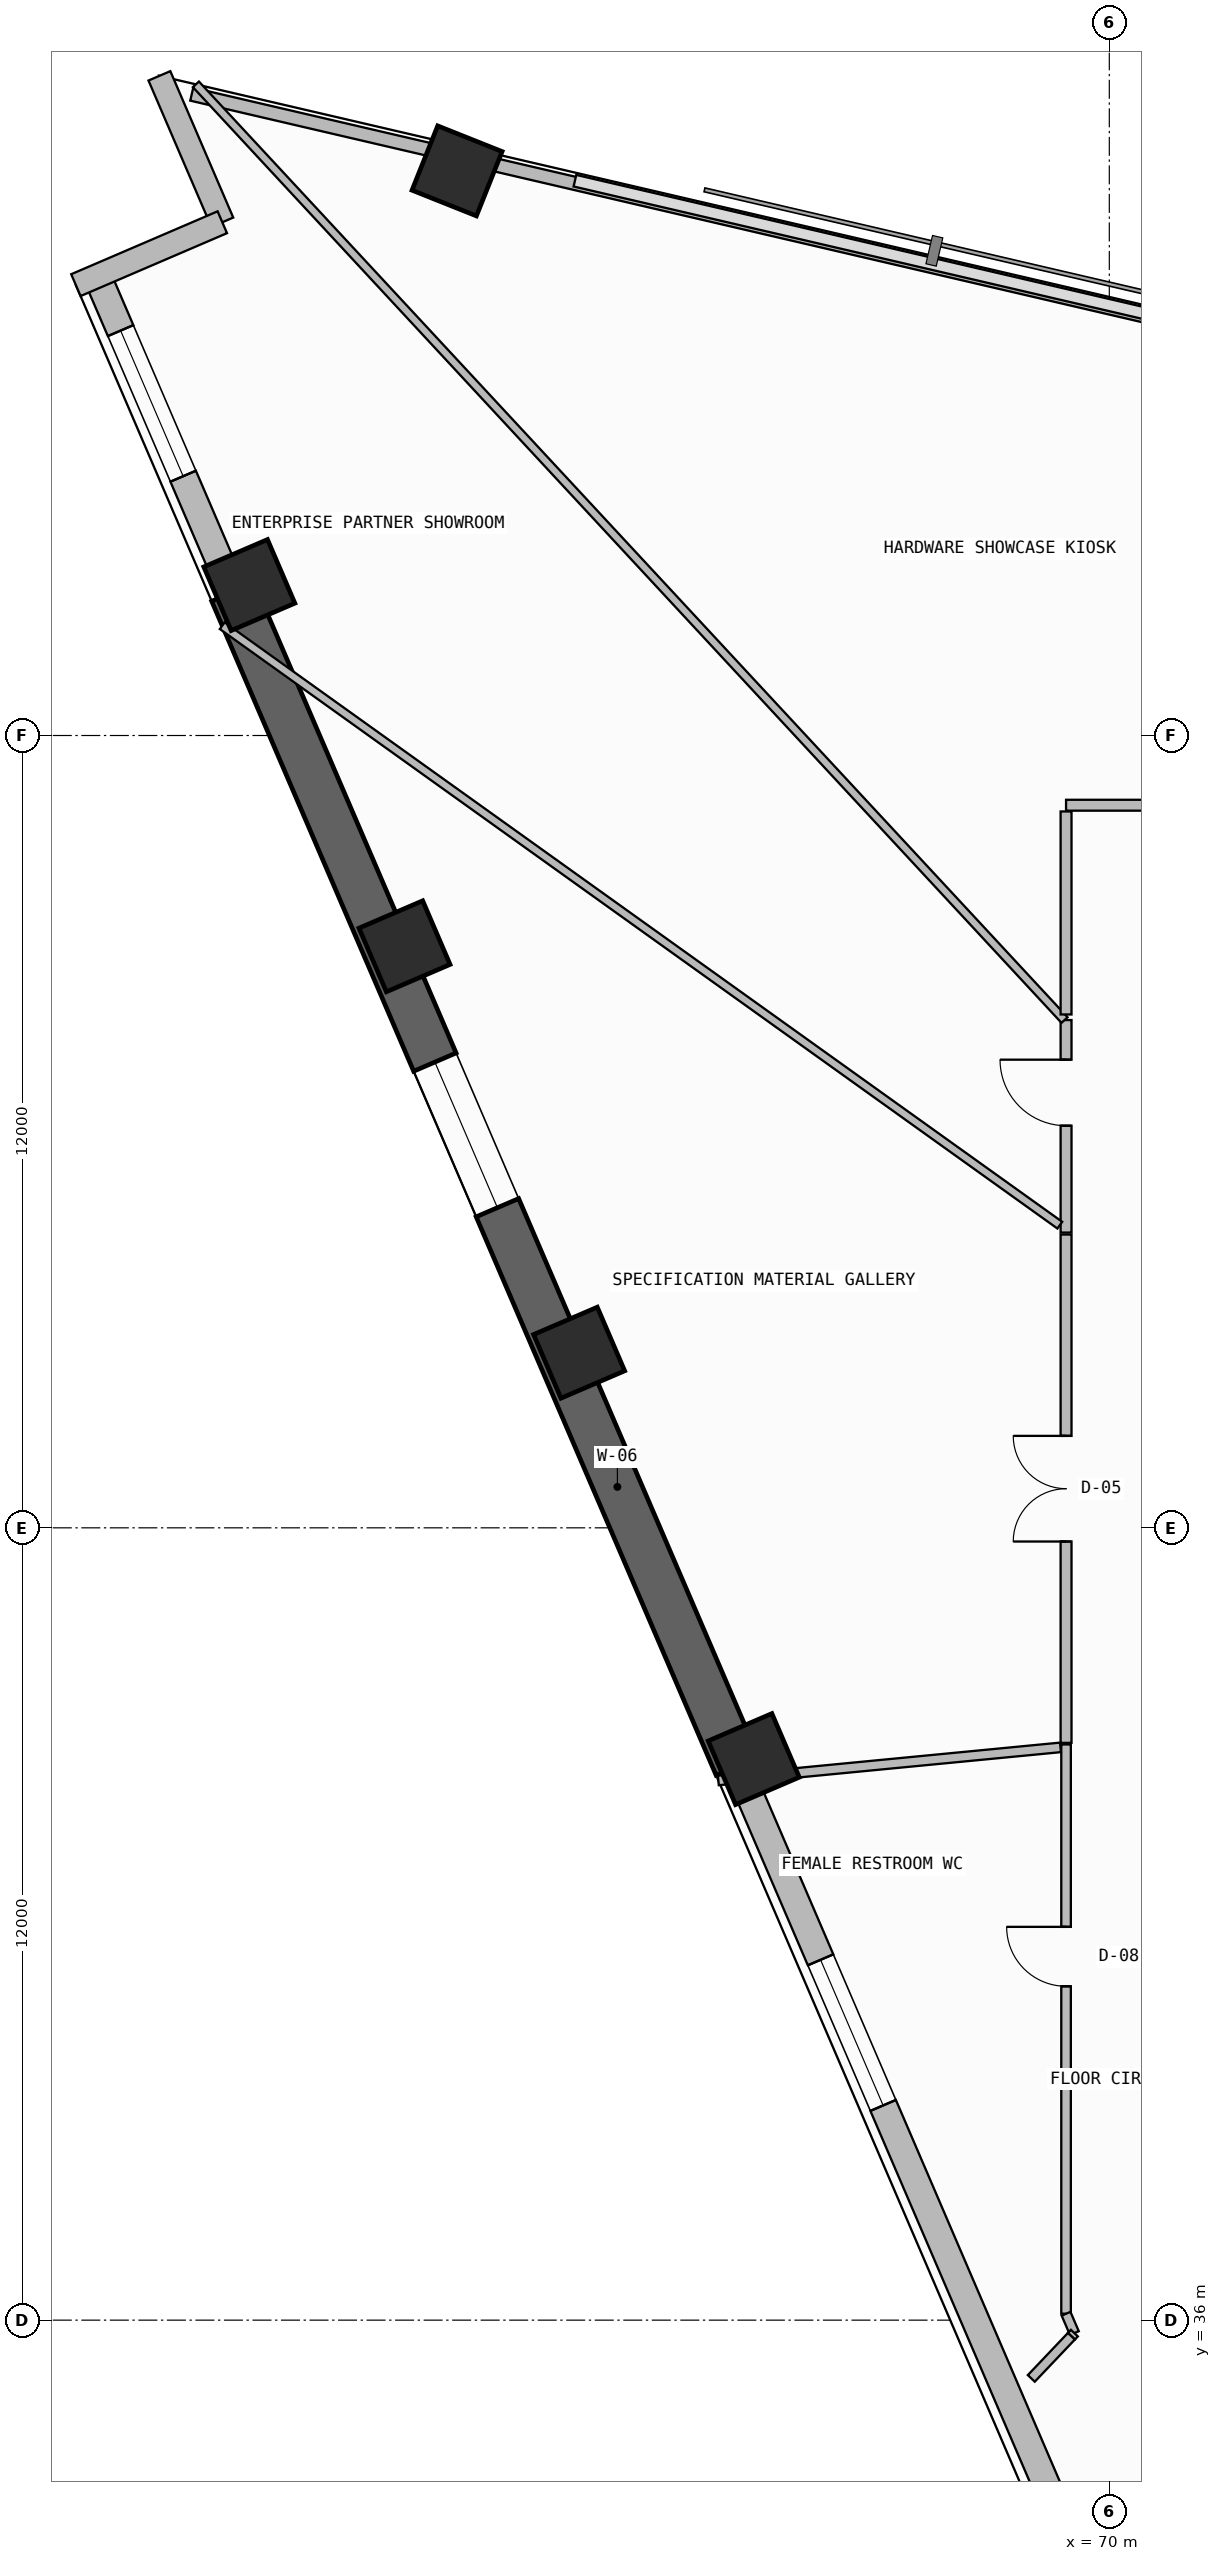
"""IFC4 building model, lengths in metres.
Left out: names, types, materials, properties, quantities, classifications, styles, units other than length and angle.
Written with IfcOpenShell. Run it as: python <this file> out.ifc"""

import sys

from ifc_helpers import new_model, si_unit, direction, frame, frame_2d, origin, origin_2d, place, context, subcontext, project, spatial, rectangle, extrude, element, fill, save


model = new_model("IFC4")
c1 = context("Model", 3, precision=1e-05, world=origin(), true_north=direction((0.0, 1.0)))
c2 = subcontext(c1, "Body", "Model", "MODEL_VIEW")
j1 = project(units=[si_unit("LENGTHUNIT", "METRE"), si_unit("PLANEANGLEUNIT", "RADIAN")], contexts=[c1])
p1 = place(None, origin())
s1 = spatial("IfcSite", under=j1, at=p1, CompositionType="ELEMENT")
p2 = place(p1, origin())
s2 = spatial("IfcBuilding", under=s1, at=p2, CompositionType="ELEMENT")
p3 = place(p2, frame((0.0, 0.0, 179.1)))
s3 = spatial("IfcBuildingStorey", under=s2, at=p3, CompositionType="ELEMENT", Elevation=179.1)
for number, where, z_axis, x_axis in (
    (1, (60.122, 68.551, 0.0), (0.0, 0.0, 1.0), (0.371, 0.929, 0.0)),
    (2, (56.976, 62.279, 0.0), (0.0, 0.0, 1.0), (-0.395, 0.919, 0.0)),
    (3, (59.326, 56.807, 0.0), (0.0, 0.0, 1.0), (-0.395, 0.919, 0.0)),
    (4, (61.97, 50.653, 0.0), (0.0, 0.0, 1.0), (-0.395, 0.919, 0.0)),
    (5, (64.615, 44.498, 0.0), (0.0, 0.0, 1.0), (-0.395, 0.919, 0.0)),
):
    element("IfcColumn", number, at=place(p3, frame(where, z_axis=z_axis, x_axis=x_axis)), inside=s3, PredefinedType="COLUMN", context=c2, shape_type="SweptSolid", body=[
        extrude(rectangle(XDim=1.05, YDim=1.05, at=origin_2d()), origin(), (0.0, 0.0, 1.0), 3.52),
    ])
p4 = place(p3, frame((54.671, 66.959, 0.0), z_axis=(0.0, 0.0, 1.0), x_axis=(0.394733507229, -0.918795656428, 0.0)))
e6 = element("IfcWall", 6, at=p4, inside=s3, PredefinedType="SOLIDWALL", context=c2, shape_type="SweptSolid", body=[
    extrude(rectangle(XDim=5.21, YDim=0.42, at=frame_2d((2.605, 0.0))), origin(), (0.0, 0.0, 1.0), 2.645),
])
p5 = place(p4, frame((0.9, 0.0, 1.2)))
e7 = element("IfcOpeningElement", 7, at=p5, cuts=e6, PredefinedType="OPENING", context=c2, shape_type="SweptSolid", body=[
    extrude(rectangle(XDim=2.4, YDim=0.9, at=frame_2d((1.2, 0.45))), frame((0.0, 0.22, 0.0), z_axis=(0.0, -1.0, 0.0), x_axis=(1.0, 0.0, 0.0)), (0.0, 0.0, 1.0), 0.44),
])
p6 = place(p3, frame((56.728, 62.172, -0.26), z_axis=(0.0, 0.0, 1.0), x_axis=(0.394736752992, -0.918794261974, 0.0)))
e8 = element("IfcWall", 8, at=p6, inside=s3, PredefinedType="SHEAR", context=c2, shape_type="SweptSolid", body=[
    extrude(rectangle(XDim=19.353, YDim=0.7, at=frame_2d((9.676, 0.0))), origin(), (0.0, 0.0, 1.0), 3.52),
])
p7 = place(p6, frame((7.747, 0.0, 1.2)))
e9 = element("IfcOpeningElement", 9, at=p7, cuts=e8, PredefinedType="OPENING", context=c2, shape_type="SweptSolid", body=[
    extrude(rectangle(XDim=2.4, YDim=0.9, at=frame_2d((1.2, 0.45))), frame((0.0, 0.36, 0.0), z_axis=(0.0, -1.0, 0.0), x_axis=(1.0, 0.0, 0.0)), (0.0, 0.0, 1.0), 0.72),
])
p8 = place(p3, frame((64.367, 44.391, 0.0), z_axis=(0.0, 0.0, 1.0), x_axis=(0.394757430431, -0.918785378159, 0.0)))
e10 = element("IfcWall", 10, at=p8, inside=s3, PredefinedType="SOLIDWALL", context=c2, shape_type="SweptSolid", body=[
    extrude(rectangle(XDim=12.654, YDim=0.42, at=frame_2d((6.327, 0.0))), origin(), (0.0, 0.0, 1.0), 2.645),
])
p9 = place(p8, frame((3.193, 0.0, 1.2)))
e11 = element("IfcOpeningElement", 11, at=p9, cuts=e10, PredefinedType="OPENING", context=c2, shape_type="SweptSolid", body=[
    extrude(rectangle(XDim=2.4, YDim=0.9, at=frame_2d((1.2, 0.45))), frame((0.0, 0.22, 0.0), z_axis=(0.0, -1.0, 0.0), x_axis=(1.0, 0.0, 0.0)), (0.0, 0.0, 1.0), 0.44),
])
p10 = place(p3, frame((55.614, 69.991, 0.0), z_axis=(0.0, 0.0, 1.0), x_axis=(0.394663989422, -0.918825519592, 0.0)))
e12 = element("IfcWall", 12, at=p10, inside=s3, PredefinedType="SOLIDWALL", context=c2, shape_type="SweptSolid", body=[
    extrude(rectangle(XDim=2.413, YDim=0.36, at=frame_2d((1.207, 0.0))), origin(), (0.0, 0.0, 1.0), 3.26),
])
p11 = place(p3, frame((56.566, 67.773, 0.0), z_axis=(0.0, 0.0, 1.0), x_axis=(-0.918788830096, -0.394749396062, 0.0)))
e13 = element("IfcWall", 13, at=p11, inside=s3, PredefinedType="SOLIDWALL", context=c2, shape_type="SweptSolid", body=[
    extrude(rectangle(XDim=2.413, YDim=0.36, at=frame_2d((1.207, 0.0))), origin(), (0.0, 0.0, 1.0), 3.26),
])
p12 = place(p3, frame((69.04, 32.627, 0.0), z_axis=(0.0, 0.0, 1.0), x_axis=(0.91879775808, 0.394728615312, 0.0)))
e14 = element("IfcWall", 14, at=p12, inside=s3, PredefinedType="SOLIDWALL", context=c2, shape_type="SweptSolid", body=[
    extrude(rectangle(XDim=3.713, YDim=0.36, at=frame_2d((1.856, 0.0))), origin(), (0.0, 0.0, 1.0), 3.26),
])
p13 = place(p3, frame((87.165, 62.482, 0.0), z_axis=(0.0, 0.0, 1.0), x_axis=(-0.973958631559, 0.226725790352, 0.0)))
e15 = element("IfcWall", 15, at=p13, inside=s3, PredefinedType="PARAPET", context=c2, shape_type="SweptSolid", body=[
    extrude(rectangle(XDim=27.376, YDim=0.2, at=frame_2d((13.688, 0.0))), origin(), (0.0, 0.0, 1.0), 1.15),
])
p14 = place(p3, frame((59.841, 68.843, 0.0), z_axis=(0.0, 0.0, 1.0), x_axis=(-0.973951848941, 0.226754924851, 0.0)))
e16 = element("IfcWall", 16, at=p14, inside=s3, PredefinedType="PARAPET", context=c2, shape_type="SweptSolid", body=[
    extrude(rectangle(XDim=3.837, YDim=0.2, at=frame_2d((1.918, 0.0))), origin(), (0.0, 0.0, 1.0), 1.15),
])
p15 = place(p3, frame((69.345, 44.719, 0.0), z_axis=(0.0, 0.0, 1.0), x_axis=(0.0, -1.0, 0.0)))
e17 = element("IfcWall", 17, at=p15, inside=s3, PredefinedType="PARTITIONING", context=c2, shape_type="SweptSolid", body=[
    extrude(rectangle(XDim=8.622, YDim=0.145, at=frame_2d((4.311, 0.0))), origin(), (0.0, 0.0, 1.0), 3.26),
])
p16 = place(p15, frame((2.763, 0.0, 0.0)))
e18 = element("IfcOpeningElement", 18, at=p16, cuts=e17, PredefinedType="OPENING", context=c2, shape_type="SweptSolid", body=[
    extrude(rectangle(XDim=0.9, YDim=2.1, at=frame_2d((0.45, 1.05))), frame((0.0, 0.083, 0.0), z_axis=(0.0, -1.0, 0.0), x_axis=(1.0, 0.0, 0.0)), (0.0, 0.0, 1.0), 0.165),
])
p17 = place(p3, frame((69.345, 36.097, 0.0), z_axis=(0.0, 0.0, 1.0), x_axis=(0.394472817694, -0.918907610209, 0.0)))
e19 = element("IfcWall", 19, at=p17, inside=s3, PredefinedType="PARTITIONING", context=c2, shape_type="SweptSolid", body=[
    extrude(rectangle(XDim=0.319, YDim=0.145, at=frame_2d((0.16, 0.0))), origin(), (0.0, 0.0, 1.0), 3.26),
])
p18 = place(p3, frame((69.471, 35.804, 0.0), z_axis=(0.0, 0.0, 1.0), x_axis=(-0.690029650349, -0.723781100637, 0.0)))
e20 = element("IfcWall", 20, at=p18, inside=s3, PredefinedType="PARTITIONING", context=c2, shape_type="SweptSolid", body=[
    extrude(rectangle(XDim=0.065, YDim=0.145, at=frame_2d((0.033, 0.0))), origin(), (0.0, 0.0, 1.0), 3.26),
])
p19 = place(p3, frame((64.079, 44.174, 0.0), z_axis=(0.0, 0.0, 1.0), x_axis=(0.995367692374, 0.096141338549, 0.0)))
e21 = element("IfcWall", 21, at=p19, inside=s3, PredefinedType="PARTITIONING", context=c2, shape_type="SweptSolid", body=[
    extrude(rectangle(XDim=5.206, YDim=0.145, at=frame_2d((2.603, 0.0))), origin(), (0.0, 0.0, 1.0), 3.26),
])
p20 = place(p3, frame((69.345, 55.69, 0.0), z_axis=(0.0, 0.0, 1.0), x_axis=(0.0, -1.0, 0.0)))
e22 = element("IfcWall", 22, at=p20, inside=s3, PredefinedType="PARTITIONING", context=c2, shape_type="SweptSolid", body=[
    extrude(rectangle(XDim=3.219, YDim=0.165, at=frame_2d((1.609, 0.0))), origin(), (0.0, 0.0, 1.0), 2.745),
])
p21 = place(p20, frame((0.6, 0.0, 0.0)))
e23 = element("IfcOpeningElement", 23, at=p21, cuts=e22, PredefinedType="OPENING", context=c2, shape_type="SweptSolid", body=[
    extrude(rectangle(XDim=1.0, YDim=2.2, at=frame_2d((0.5, 1.1))), frame((0.0, 0.093, 0.0), z_axis=(0.0, -1.0, 0.0), x_axis=(1.0, 0.0, 0.0)), (0.0, 0.0, 1.0), 0.185),
])
p22 = place(p3, frame((56.167, 69.862, 0.0), z_axis=(0.0, 0.0, 1.0), x_axis=(0.680337770929, -0.732898708859, 0.0)))
e24 = element("IfcWall", 24, at=p22, inside=s3, PredefinedType="PARTITIONING", context=c2, shape_type="SweptSolid", body=[
    extrude(rectangle(XDim=19.337, YDim=0.125, at=frame_2d((9.668, 0.0))), origin(), (0.0, 0.0, 1.0), 2.645),
])
p23 = place(p3, frame((69.25, 52.584, 0.0), z_axis=(0.0, 0.0, 1.0), x_axis=(-0.81317476018, 0.58201959538, 0.0)))
e25 = element("IfcWall", 25, at=p23, inside=s3, PredefinedType="PARTITIONING", context=c2, shape_type="SweptSolid", body=[
    extrude(rectangle(XDim=15.6, YDim=0.125, at=frame_2d((7.8, 0.0))), origin(), (0.0, 0.0, 1.0), 2.645),
])
p24 = place(p3, frame((75.744, 58.944, 0.0), z_axis=(0.0, 0.0, 1.0), x_axis=(-1.0, 0.0, 0.0)))
e26 = element("IfcWall", 26, at=p24, inside=s3, PredefinedType="PARTITIONING", context=c2, shape_type="SweptSolid", body=[
    extrude(rectangle(XDim=6.399, YDim=0.165, at=frame_2d((3.199, 0.0))), origin(), (0.0, 0.0, 1.0), 2.745),
])
p25 = place(p24, frame((1.95, 0.0, 0.0)))
e27 = element("IfcOpeningElement", 27, at=p25, cuts=e26, PredefinedType="OPENING", context=c2, shape_type="SweptSolid", body=[
    extrude(rectangle(XDim=1.0, YDim=2.2, at=frame_2d((0.5, 1.1))), frame((0.0, 0.093, 0.0), z_axis=(0.0, -1.0, 0.0), x_axis=(1.0, 0.0, 0.0)), (0.0, 0.0, 1.0), 0.185),
])
p26 = place(p3, frame((69.345, 58.85, 0.0), z_axis=(0.0, 0.0, 1.0), x_axis=(0.0, -1.0, 0.0)))
e28 = element("IfcWall", 28, at=p26, inside=s3, PredefinedType="PARTITIONING", context=c2, shape_type="SweptSolid", body=[
    extrude(rectangle(XDim=3.075, YDim=0.165, at=frame_2d((1.537, 0.0))), origin(), (0.0, 0.0, 1.0), 2.745),
])
p27 = place(p3, frame((69.345, 52.442, 0.0), z_axis=(0.0, 0.0, 1.0), x_axis=(0.0, -1.0, 0.0)))
e29 = element("IfcWall", 29, at=p27, inside=s3, PredefinedType="PARTITIONING", context=c2, shape_type="SweptSolid", body=[
    extrude(rectangle(XDim=7.698, YDim=0.165, at=frame_2d((3.849, 0.0))), origin(), (0.0, 0.0, 1.0), 2.745),
])
p28 = place(p27, frame((3.049, 0.0, 0.0)))
e30 = element("IfcOpeningElement", 30, at=p28, cuts=e29, PredefinedType="OPENING", context=c2, shape_type="SweptSolid", body=[
    extrude(rectangle(XDim=1.6, YDim=2.3, at=frame_2d((0.8, 1.15))), frame((0.0, 0.093, 0.0), z_axis=(0.0, -1.0, 0.0), x_axis=(1.0, 0.0, 0.0)), (0.0, 0.0, 1.0), 0.185),
])
p29 = place(p3, frame((69.426, 35.757, 0.0), z_axis=(0.0, 0.0, 1.0), x_axis=(-0.689011535927, -0.724750373135, 0.0)))
e31 = element("IfcWall", 31, at=p29, inside=s3, PredefinedType="PARTITIONING", context=c2, shape_type="SweptSolid", body=[
    extrude(rectangle(XDim=0.881, YDim=0.145, at=frame_2d((0.441, 0.0))), origin(), (0.0, 0.0, 1.0), 3.26),
])
p30 = place(p5, origin())
e32 = element("IfcWindow", 32, at=p30, inside=s3, PartitioningType="SINGLE_PANEL", PredefinedType="WINDOW", context=c2, shape_type="SweptSolid", body=[
    extrude(rectangle(XDim=2.4, YDim=0.9, at=frame_2d((1.2, 0.45))), frame((0.0, 0.03, 0.0), z_axis=(0.0, -1.0, 0.0), x_axis=(1.0, 0.0, 0.0)), (0.0, 0.0, 1.0), 0.06),
])
fill(e7, e32)
p31 = place(p7, origin())
e33 = element("IfcWindow", 33, at=p31, inside=s3, PartitioningType="SINGLE_PANEL", PredefinedType="WINDOW", context=c2, shape_type="SweptSolid", body=[
    extrude(rectangle(XDim=2.4, YDim=0.9, at=frame_2d((1.2, 0.45))), frame((0.0, 0.03, 0.0), z_axis=(0.0, -1.0, 0.0), x_axis=(1.0, 0.0, 0.0)), (0.0, 0.0, 1.0), 0.06),
])
fill(e9, e33)
p32 = place(p9, origin())
e34 = element("IfcWindow", 34, at=p32, inside=s3, PartitioningType="SINGLE_PANEL", PredefinedType="WINDOW", context=c2, shape_type="SweptSolid", body=[
    extrude(rectangle(XDim=2.4, YDim=0.9, at=frame_2d((1.2, 0.45))), frame((0.0, 0.03, 0.0), z_axis=(0.0, -1.0, 0.0), x_axis=(1.0, 0.0, 0.0)), (0.0, 0.0, 1.0), 0.06),
])
fill(e11, e34)
p33 = place(p16, frame((0.9, 0.0, 0.0), z_axis=(0.0, 0.0, 1.0), x_axis=(-1.0, 0.0, 0.0)))
e35 = element("IfcDoor", 35, at=p33, inside=s3, OperationType="SINGLE_SWING_RIGHT", PredefinedType="DOOR", context=c2, shape_type="SweptSolid", body=[
    extrude(rectangle(XDim=0.9, YDim=2.1, at=frame_2d((0.45, 1.05))), frame((0.0, 0.025, 0.0), z_axis=(0.0, -1.0, 0.0), x_axis=(1.0, 0.0, 0.0)), (0.0, 0.0, 1.0), 0.05),
])
fill(e18, e35)
p34 = place(p21, frame((1.0, 0.0, 0.0), z_axis=(0.0, 0.0, 1.0), x_axis=(-1.0, 0.0, 0.0)))
e36 = element("IfcDoor", 36, at=p34, inside=s3, OperationType="SINGLE_SWING_RIGHT", PredefinedType="DOOR", context=c2, shape_type="SweptSolid", body=[
    extrude(rectangle(XDim=1.0, YDim=2.2, at=frame_2d((0.5, 1.1))), frame((0.0, 0.025, 0.0), z_axis=(0.0, -1.0, 0.0), x_axis=(1.0, 0.0, 0.0)), (0.0, 0.0, 1.0), 0.05),
])
fill(e23, e36)
p35 = place(p28, frame((1.6, 0.0, 0.0), z_axis=(0.0, 0.0, 1.0), x_axis=(-1.0, 0.0, 0.0)))
e37 = element("IfcDoor", 37, at=p35, inside=s3, OperationType="DOUBLE_DOOR_SINGLE_SWING", PredefinedType="DOOR", context=c2, shape_type="SweptSolid", body=[
    extrude(rectangle(XDim=1.6, YDim=2.3, at=frame_2d((0.8, 1.15))), frame((0.0, 0.025, 0.0), z_axis=(0.0, -1.0, 0.0), x_axis=(1.0, 0.0, 0.0)), (0.0, 0.0, 1.0), 0.05),
])
fill(e30, e37)
save(model, sys.argv[1])
